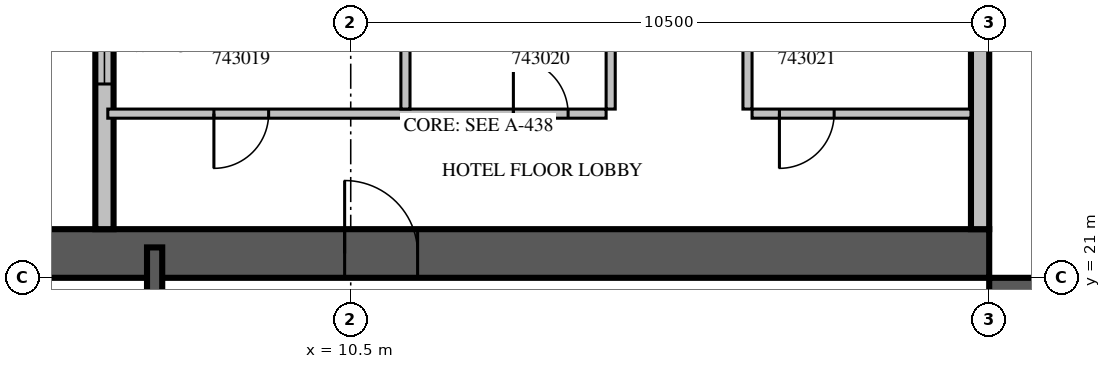
"""IFC4 building model, lengths in metres.
Left out: names, types, materials, properties, quantities, classifications, styles, units other than length and angle.
Written with IfcOpenShell. Run it as: python <this file> out.ifc"""

import sys

from ifc_helpers import new_model, si_unit, direction, frame, frame_2d, origin, place, context, subcontext, project, spatial, rectangle, extrude, source, transform, mapped, element, fill, save


model = new_model("IFC4")
c1 = context("Model", 3, precision=1e-05, world=origin(), true_north=direction((0.0, 1.0)))
c2 = subcontext(c1, "Body", "Model", "MODEL_VIEW")
j1 = project(units=[si_unit("LENGTHUNIT", "METRE"), si_unit("PLANEANGLEUNIT", "RADIAN")], contexts=[c1])
p1 = place(None, origin())
s1 = spatial("IfcSite", under=j1, at=p1, CompositionType="ELEMENT")
p2 = place(p1, origin())
s2 = spatial("IfcBuilding", under=s1, at=p2, CompositionType="ELEMENT")
p3 = place(p2, frame((0.0, 0.0, 196.8)))
s3 = spatial("IfcBuildingStorey", under=s2, at=p3, CompositionType="ELEMENT", Elevation=196.8)
m1 = source(origin(), c2, "Body", "SweptSolid", [
    extrude(rectangle(XDim=16.8, YDim=0.8, at=frame_2d((8.4, 0.0))), origin(), (0.0, 0.0, 1.0), 3.8),
])
p4 = place(p3, frame((21.4, 4.2, 0.0), z_axis=(0.0, 0.0, 1.0), x_axis=(0.0, 1.0, 0.0)))
e1 = element("IfcWall", 1, at=p4, inside=s3, PredefinedType="SHEAR", context=c2, shape_type="MappedRepresentation", body=[
    mapped(m1, transform((0.0, 0.0, 0.0), scale=1.0)),
])
m2 = source(origin(), c2, "Body", "SweptSolid", [
    extrude(rectangle(XDim=2.2, YDim=2.1, at=frame_2d((1.1, 1.05))), frame((0.0, 0.41, 0.0), z_axis=(0.0, -1.0, 0.0), x_axis=(1.0, 0.0, 0.0)), (0.0, 0.0, 1.0), 0.82),
])
p5 = place(p4, frame((4.2, 0.0, 0.0)))
e2 = element("IfcOpeningElement", 2, at=p5, cuts=e1, PredefinedType="OPENING", context=c2, shape_type="MappedRepresentation", body=[
    mapped(m2, transform((0.0, 0.0, 0.0), scale=1.0)),
])
m3 = source(origin(), c2, "Body", "SweptSolid", [
    extrude(rectangle(XDim=1.2, YDim=2.1, at=frame_2d((0.6, 1.05))), frame((0.0, 0.41, 0.0), z_axis=(0.0, -1.0, 0.0), x_axis=(1.0, 0.0, 0.0)), (0.0, 0.0, 1.0), 0.82),
])
p6 = place(p4, frame((14.7, 0.0, 0.0)))
e3 = element("IfcOpeningElement", 3, at=p6, cuts=e1, PredefinedType="OPENING", context=c2, shape_type="MappedRepresentation", body=[
    mapped(m3, transform((0.0, 0.0, 0.0), scale=1.0)),
])
p7 = place(p3, frame((4.2, 21.4, 0.0), z_axis=(0.0, 0.0, 1.0), x_axis=(1.0, 0.0, 0.0)))
e4 = element("IfcWall", 4, at=p7, inside=s3, PredefinedType="SHEAR", context=c2, shape_type="MappedRepresentation", body=[
    mapped(m1, transform((0.0, 0.0, 0.0), scale=1.0)),
])
p8 = place(p7, frame((6.2, 0.0, 0.0)))
e5 = element("IfcOpeningElement", 5, at=p8, cuts=e4, PredefinedType="OPENING", context=c2, shape_type="MappedRepresentation", body=[
    mapped(m3, transform((0.0, 0.0, 0.0), scale=1.0)),
])
m4 = source(origin(), c2, "Body", "SweptSolid", [
    extrude(rectangle(XDim=7.15, YDim=0.3, at=frame_2d((3.575, 0.0))), origin(), (0.0, 0.0, 1.0), 3.4),
])
p9 = place(p3, frame((20.85, 21.8, 0.0), z_axis=(0.0, 0.0, 1.0), x_axis=(0.0, 1.0, 0.0)))
e6 = element("IfcWall", 6, at=p9, inside=s3, PredefinedType="STANDARD", context=c2, shape_type="MappedRepresentation", body=[
    mapped(m4, transform((0.0, 0.0, 0.0), scale=1.0)),
])
m5 = source(origin(), c2, "Body", "SweptSolid", [
    extrude(rectangle(XDim=3.0, YDim=2.3, at=frame_2d((1.5, 1.15))), frame((0.0, 0.16, 0.0), z_axis=(0.0, -1.0, 0.0), x_axis=(1.0, 0.0, 0.0)), (0.0, 0.0, 1.0), 0.32),
])
p10 = place(p9, frame((4.0, 0.0, 0.6)))
e7 = element("IfcOpeningElement", 7, at=p10, cuts=e6, PredefinedType="OPENING", context=c2, shape_type="MappedRepresentation", body=[
    mapped(m5, transform((0.0, 0.0, 0.0), scale=1.0)),
])
m6 = source(origin(), c2, "Body", "SweptSolid", [
    extrude(rectangle(XDim=16.6, YDim=0.3, at=frame_2d((8.3, 0.0))), origin(), (0.0, 0.0, 1.0), 3.4),
])
p11 = place(p3, frame((6.45, 38.4, 0.0), z_axis=(0.0, 0.0, 1.0), x_axis=(0.0, -1.0, 0.0)))
e8 = element("IfcWall", 8, at=p11, inside=s3, PredefinedType="STANDARD", context=c2, shape_type="MappedRepresentation", body=[
    mapped(m6, transform((0.0, 0.0, 0.0), scale=1.0)),
])
m7 = source(origin(), c2, "Body", "SweptSolid", [
    extrude(rectangle(XDim=1.8, YDim=2.3, at=frame_2d((0.9, 1.15))), frame((0.0, 0.16, 0.0), z_axis=(0.0, -1.0, 0.0), x_axis=(1.0, 0.0, 0.0)), (0.0, 0.0, 1.0), 0.32),
])
p12 = place(p11, frame((1.15, 0.0, 0.6)))
e9 = element("IfcOpeningElement", 9, at=p12, cuts=e8, PredefinedType="OPENING", context=c2, shape_type="MappedRepresentation", body=[
    mapped(m7, transform((0.0, 0.0, 0.0), scale=1.0)),
])
p13 = place(p11, frame((9.438, 0.0, 0.6)))
e10 = element("IfcOpeningElement", 10, at=p13, cuts=e8, PredefinedType="OPENING", context=c2, shape_type="MappedRepresentation", body=[
    mapped(m7, transform((0.0, 0.0, 0.0), scale=1.0)),
])
m8 = source(origin(), c2, "Body", "SweptSolid", [
    extrude(rectangle(XDim=1.2, YDim=2.3, at=frame_2d((0.6, 1.15))), frame((0.0, 0.16, 0.0), z_axis=(0.0, -1.0, 0.0), x_axis=(1.0, 0.0, 0.0)), (0.0, 0.0, 1.0), 0.32),
])
p14 = place(p11, frame((13.012, 0.0, 0.6)))
e11 = element("IfcOpeningElement", 11, at=p14, cuts=e8, PredefinedType="OPENING", context=c2, shape_type="MappedRepresentation", body=[
    mapped(m8, transform((0.0, 0.0, 0.0), scale=1.0)),
])
m9 = source(origin(), c2, "Body", "SweptSolid", [
    extrude(rectangle(XDim=1.0, YDim=2.1, at=frame_2d((0.5, 1.05))), frame((0.0, 0.16, 0.0), z_axis=(0.0, -1.0, 0.0), x_axis=(1.0, 0.0, 0.0)), (0.0, 0.0, 1.0), 0.32),
])
p15 = place(p11, frame((5.45, 0.0, 0.0)))
e12 = element("IfcOpeningElement", 12, at=p15, cuts=e8, PredefinedType="OPENING", context=c2, shape_type="MappedRepresentation", body=[
    mapped(m9, transform((0.0, 0.0, 0.0), scale=1.0)),
])
m10 = source(origin(), c2, "Body", "SweptSolid", [
    extrude(rectangle(XDim=6.6, YDim=0.25, at=frame_2d((3.3, 0.0))), origin(), (0.0, 0.0, 1.0), 3.4),
])
p16 = place(p3, frame((7.275, 14.9, 0.0), z_axis=(0.0, 0.0, 1.0), x_axis=(0.0, 1.0, 0.0)))
e13 = element("IfcWall", 13, at=p16, inside=s3, PredefinedType="SOLIDWALL", context=c2, shape_type="MappedRepresentation", body=[
    mapped(m10, transform((0.0, 0.0, 0.0), scale=1.0)),
])
m11 = source(origin(), c2, "Body", "SweptSolid", [
    extrude(rectangle(XDim=1.1, YDim=2.1, at=frame_2d((0.55, 1.05))), frame((0.0, 0.135, 0.0), z_axis=(0.0, -1.0, 0.0), x_axis=(1.0, 0.0, 0.0)), (0.0, 0.0, 1.0), 0.27),
])
p17 = place(p16, frame((0.15, 0.0, 0.0)))
e14 = element("IfcOpeningElement", 14, at=p17, cuts=e13, PredefinedType="OPENING", context=c2, shape_type="MappedRepresentation", body=[
    mapped(m11, transform((0.0, 0.0, 0.0), scale=1.0)),
])
p18 = place(p3, frame((6.505, 23.7, 0.0), z_axis=(0.0, 0.0, 1.0), x_axis=(1.0, 0.0, 0.0)))
e15 = element("IfcWall", 15, at=p18, inside=s3, PredefinedType="PARTITIONING", context=c2, shape_type="SweptSolid", body=[
    extrude(rectangle(XDim=8.195, YDim=0.15, at=frame_2d((4.098, 0.0))), origin(), (0.0, 0.0, 1.0), 3.4),
])
m12 = source(origin(), c2, "Body", "SweptSolid", [
    extrude(rectangle(XDim=0.9, YDim=2.1, at=frame_2d((0.45, 1.05))), frame((0.0, 0.085, 0.0), z_axis=(0.0, -1.0, 0.0), x_axis=(1.0, 0.0, 0.0)), (0.0, 0.0, 1.0), 0.17),
])
p19 = place(p18, frame((1.745, 0.0, 0.0)))
e16 = element("IfcOpeningElement", 16, at=p19, cuts=e15, PredefinedType="OPENING", context=c2, shape_type="MappedRepresentation", body=[
    mapped(m12, transform((0.0, 0.0, 0.0), scale=1.0)),
])
p20 = place(p18, frame((6.67, 0.0, 0.0)))
e17 = element("IfcOpeningElement", 17, at=p20, cuts=e15, PredefinedType="OPENING", context=c2, shape_type="MappedRepresentation", body=[
    mapped(m12, transform((0.0, 0.0, 0.0), scale=1.0)),
])
m13 = source(origin(), c2, "Body", "SweptSolid", [
    extrude(rectangle(XDim=3.6, YDim=0.15, at=frame_2d((1.8, 0.0))), origin(), (0.0, 0.0, 1.0), 3.4),
])
p21 = place(p3, frame((17.1, 23.7, 0.0), z_axis=(0.0, 0.0, 1.0), x_axis=(1.0, 0.0, 0.0)))
e18 = element("IfcWall", 18, at=p21, inside=s3, PredefinedType="PARTITIONING", context=c2, shape_type="MappedRepresentation", body=[
    mapped(m13, transform((0.0, 0.0, 0.0), scale=1.0)),
])
p22 = place(p21, frame((0.45, 0.0, 0.0)))
e19 = element("IfcOpeningElement", 19, at=p22, cuts=e18, PredefinedType="OPENING", context=c2, shape_type="MappedRepresentation", body=[
    mapped(m12, transform((0.0, 0.0, 0.0), scale=1.0)),
])
m14 = source(origin(), c2, "Body", "SweptSolid", [
    extrude(rectangle(XDim=5.55, YDim=0.15, at=frame_2d((2.775, 0.0))), origin(), (0.0, 0.0, 1.0), 3.4),
])
for number, where, z_axis, x_axis in (
    (20, (11.4, 23.775, 0.0), (0.0, 0.0, 1.0), (0.0, 1.0, 0.0)),
    (21, (14.775, 23.775, 0.0), (0.0, 0.0, 1.0), (0.0, 1.0, 0.0)),
    (22, (17.025, 29.325, 0.0), (0.0, 0.0, 1.0), (0.0, -1.0, 0.0)),
):
    element("IfcWall", number, at=place(p3, frame(where, z_axis=z_axis, x_axis=x_axis)), inside=s3, PredefinedType="PARTITIONING", context=c2, shape_type="MappedRepresentation", body=[
        mapped(m14, transform((0.0, 0.0, 0.0), scale=1.0)),
    ])
m15 = source(origin(), c2, "Body", "SweptSolid", [
    extrude(rectangle(XDim=1.2, YDim=2.3, at=frame_2d((0.6, 1.15))), frame((0.0, 0.03, 0.0), z_axis=(0.0, -1.0, 0.0), x_axis=(1.0, 0.0, 0.0)), (0.0, 0.0, 1.0), 0.06),
])
p23 = place(p14, origin())
e23 = element("IfcWindow", 23, at=p23, inside=s3, PartitioningType="SINGLE_PANEL", PredefinedType="WINDOW", context=c2, shape_type="MappedRepresentation", body=[
    mapped(m15, transform((0.0, 0.0, 0.0), scale=1.0)),
])
fill(e11, e23)
m16 = source(origin(), c2, "Body", "SweptSolid", [
    extrude(rectangle(XDim=1.2, YDim=2.1, at=frame_2d((0.6, 1.05))), frame((0.0, 0.025, 0.0), z_axis=(0.0, -1.0, 0.0), x_axis=(1.0, 0.0, 0.0)), (0.0, 0.0, 1.0), 0.05),
])
p24 = place(p8, origin())
e24 = element("IfcDoor", 24, at=p24, inside=s3, OperationType="SINGLE_SWING_LEFT", PredefinedType="DOOR", context=c2, shape_type="MappedRepresentation", body=[
    mapped(m16, transform((0.0, 0.0, 0.0), scale=1.0)),
])
fill(e5, e24)
m17 = source(origin(), c2, "Body", "SweptSolid", [
    extrude(rectangle(XDim=0.9, YDim=2.1, at=frame_2d((0.45, 1.05))), frame((0.0, 0.025, 0.0), z_axis=(0.0, -1.0, 0.0), x_axis=(1.0, 0.0, 0.0)), (0.0, 0.0, 1.0), 0.05),
])
p25 = place(p19, origin())
e25 = element("IfcDoor", 25, at=p25, inside=s3, OperationType="SINGLE_SWING_RIGHT", PredefinedType="DOOR", context=c2, shape_type="MappedRepresentation", body=[
    mapped(m17, transform((0.0, 0.0, 0.0), scale=1.0)),
])
fill(e16, e25)
p26 = place(p20, origin())
e26 = element("IfcDoor", 26, at=p26, inside=s3, OperationType="SINGLE_SWING_LEFT", PredefinedType="DOOR", context=c2, shape_type="MappedRepresentation", body=[
    mapped(m17, transform((0.0, 0.0, 0.0), scale=1.0)),
])
fill(e17, e26)
p27 = place(p22, origin())
e27 = element("IfcDoor", 27, at=p27, inside=s3, OperationType="SINGLE_SWING_RIGHT", PredefinedType="DOOR", context=c2, shape_type="MappedRepresentation", body=[
    mapped(m17, transform((0.0, 0.0, 0.0), scale=1.0)),
])
fill(e19, e27)
save(model, sys.argv[1])
